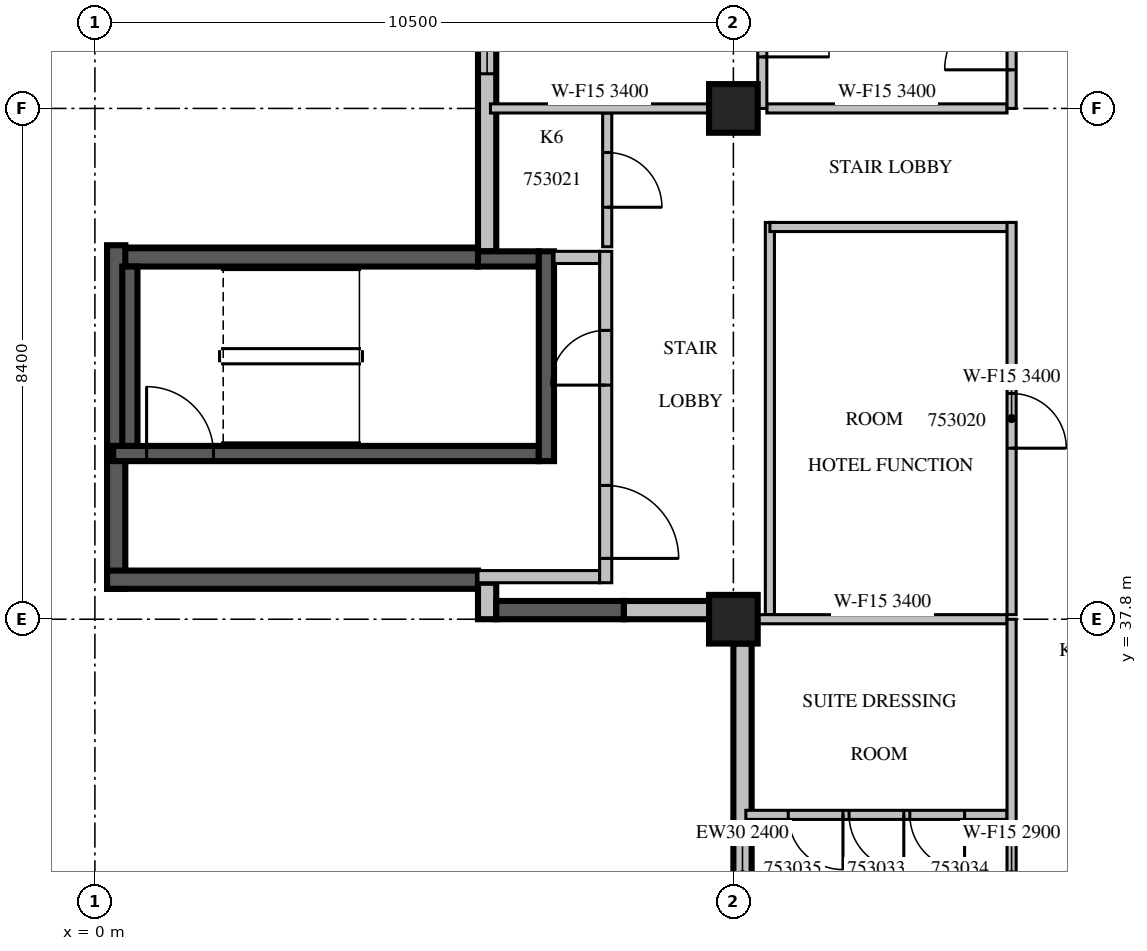
"""IFC4 building model, lengths in metres.
Left out: names, types, materials, properties, quantities, classifications, styles, units other than length and angle.
Written with IfcOpenShell. Run it as: python <this file> out.ifc"""

import sys

from ifc_helpers import new_model, si_unit, direction, frame, frame_2d, origin, origin_2d, place, context, subcontext, project, spatial, rectangle, extrude, source, transform, mapped, element, fill, save


model = new_model("IFC4")
c1 = context("Model", 3, precision=1e-05, world=origin(), true_north=direction((0.0, 1.0)))
c2 = subcontext(c1, "Body", "Model", "MODEL_VIEW")
j1 = project(units=[si_unit("LENGTHUNIT", "METRE"), si_unit("PLANEANGLEUNIT", "RADIAN")], contexts=[c1])
p1 = place(None, origin())
s1 = spatial("IfcSite", under=j1, at=p1, CompositionType="ELEMENT")
p2 = place(p1, origin())
s2 = spatial("IfcBuilding", under=s1, at=p2, CompositionType="ELEMENT")
p3 = place(p2, frame((0.0, 0.0, 234.8)))
s3 = spatial("IfcBuildingStorey", under=s2, at=p3, CompositionType="ELEMENT", Elevation=234.8)
m1 = source(origin(), c2, "Body", "SweptSolid", [
    extrude(rectangle(XDim=0.8, YDim=0.8, at=origin_2d()), origin(), (0.0, 0.0, 1.0), 3.8),
])
for number, where, z_axis, x_axis in (
    (1, (10.5, 37.8, 0.0), (0.0, 0.0, 1.0), (1.0, 0.0, 0.0)),
    (2, (10.5, 46.2, 0.0), (0.0, 0.0, 1.0), (1.0, 0.0, 0.0)),
):
    element("IfcColumn", number, at=place(p3, frame(where, z_axis=z_axis, x_axis=x_axis)), inside=s3, PredefinedType="COLUMN", context=c2, shape_type="MappedRepresentation", body=[
        mapped(m1, transform((0.0, 0.0, 0.0), scale=1.0)),
    ])
m2 = source(origin(), c2, "Body", "SweptSolid", [
    extrude(rectangle(XDim=9.91, YDim=0.3, at=frame_2d((4.955, 0.0))), origin(), (0.0, 0.0, 1.0), 3.4),
])
p4 = place(p3, frame((6.45, 53.76, 0.0), z_axis=(0.0, 0.0, 1.0), x_axis=(0.0, -1.0, 0.0)))
e3 = element("IfcWall", 3, at=p4, inside=s3, PredefinedType="STANDARD", context=c2, shape_type="MappedRepresentation", body=[
    mapped(m2, transform((0.0, 0.0, 0.0), scale=1.0)),
])
m3 = source(origin(), c2, "Body", "SweptSolid", [
    extrude(rectangle(XDim=3.6, YDim=2.3, at=frame_2d((1.8, 1.15))), frame((0.0, 0.16, 0.0), z_axis=(0.0, -1.0, 0.0), x_axis=(1.0, 0.0, 0.0)), (0.0, 0.0, 1.0), 0.32),
])
p5 = place(p4, frame((3.39, 0.0, 0.6)))
e4 = element("IfcOpeningElement", 4, at=p5, cuts=e3, PredefinedType="OPENING", context=c2, shape_type="MappedRepresentation", body=[
    mapped(m3, transform((0.0, 0.0, 0.0), scale=1.0)),
])
m4 = source(origin(), c2, "Body", "SweptSolid", [
    extrude(rectangle(XDim=2.4, YDim=2.3, at=frame_2d((1.2, 1.15))), frame((0.0, 0.16, 0.0), z_axis=(0.0, -1.0, 0.0), x_axis=(1.0, 0.0, 0.0)), (0.0, 0.0, 1.0), 0.32),
])
p6 = place(p4, frame((0.495, 0.0, 0.6)))
e5 = element("IfcOpeningElement", 5, at=p6, cuts=e3, PredefinedType="OPENING", context=c2, shape_type="MappedRepresentation", body=[
    mapped(m4, transform((0.0, 0.0, 0.0), scale=1.0)),
])
m5 = source(origin(), c2, "Body", "SweptSolid", [
    extrude(rectangle(XDim=6.1, YDim=0.3, at=frame_2d((3.05, 0.0))), origin(), (0.0, 0.0, 1.0), 3.4),
])
p7 = place(p3, frame((6.3, 43.75, 0.0), z_axis=(0.0, 0.0, 1.0), x_axis=(-1.0, 0.0, 0.0)))
e6 = element("IfcWall", 6, at=p7, inside=s3, PredefinedType="SOLIDWALL", context=c2, shape_type="MappedRepresentation", body=[
    mapped(m5, transform((0.0, 0.0, 0.0), scale=1.0)),
])
m6 = source(origin(), c2, "Body", "SweptSolid", [
    extrude(rectangle(XDim=5.65, YDim=0.3, at=frame_2d((2.825, 0.0))), origin(), (0.0, 0.0, 1.0), 3.4),
])
p8 = place(p3, frame((0.35, 43.95, 0.0), z_axis=(0.0, 0.0, 1.0), x_axis=(0.0, -1.0, 0.0)))
e7 = element("IfcWall", 7, at=p8, inside=s3, PredefinedType="SOLIDWALL", context=c2, shape_type="MappedRepresentation", body=[
    mapped(m6, transform((0.0, 0.0, 0.0), scale=1.0)),
])
p9 = place(p3, frame((0.2, 38.45, 0.0), z_axis=(0.0, 0.0, 1.0), x_axis=(1.0, 0.0, 0.0)))
e8 = element("IfcWall", 8, at=p9, inside=s3, PredefinedType="SOLIDWALL", context=c2, shape_type="MappedRepresentation", body=[
    mapped(m5, transform((0.0, 0.0, 0.0), scale=1.0)),
])
m7 = source(origin(), c2, "Body", "SweptSolid", [
    extrude(rectangle(XDim=0.6, YDim=0.3, at=frame_2d((0.3, 0.0))), origin(), (0.0, 0.0, 1.0), 3.4),
])
p10 = place(p3, frame((6.45, 38.4, 0.0), z_axis=(0.0, 0.0, 1.0), x_axis=(0.0, -1.0, 0.0)))
e9 = element("IfcWall", 9, at=p10, inside=s3, PredefinedType="STANDARD", context=c2, shape_type="MappedRepresentation", body=[
    mapped(m7, transform((0.0, 0.0, 0.0), scale=1.0)),
])
m8 = source(origin(), c2, "Body", "SweptSolid", [
    extrude(rectangle(XDim=2.1, YDim=0.3, at=frame_2d((1.05, 0.0))), origin(), (0.0, 0.0, 1.0), 3.4),
])
p11 = place(p3, frame((6.6, 37.95, 0.0), z_axis=(0.0, 0.0, 1.0), x_axis=(1.0, 0.0, 0.0)))
e10 = element("IfcWall", 10, at=p11, inside=s3, PredefinedType="SOLIDWALL", context=c2, shape_type="MappedRepresentation", body=[
    mapped(m8, transform((0.0, 0.0, 0.0), scale=1.0)),
])
m9 = source(origin(), c2, "Body", "SweptSolid", [
    extrude(rectangle(XDim=1.4, YDim=0.3, at=frame_2d((0.7, 0.0))), origin(), (0.0, 0.0, 1.0), 3.4),
])
p12 = place(p3, frame((8.7, 37.95, 0.0), z_axis=(0.0, 0.0, 1.0), x_axis=(1.0, 0.0, 0.0)))
e11 = element("IfcWall", 11, at=p12, inside=s3, PredefinedType="STANDARD", context=c2, shape_type="MappedRepresentation", body=[
    mapped(m9, transform((0.0, 0.0, 0.0), scale=1.0)),
])
p13 = place(p3, frame((10.65, 37.4, 0.0), z_axis=(0.0, 0.0, 1.0), x_axis=(0.0, -1.0, 0.0)))
e12 = element("IfcWall", 12, at=p13, inside=s3, PredefinedType="STANDARD", context=c2, shape_type="SweptSolid", body=[
    extrude(rectangle(XDim=7.6, YDim=0.3, at=frame_2d((3.8, 0.0))), origin(), (0.0, 0.0, 1.0), 2.4),
])
m10 = source(origin(), c2, "Body", "SweptSolid", [
    extrude(rectangle(XDim=7.0, YDim=0.25, at=frame_2d((3.5, 0.0))), origin(), (0.0, 0.0, 1.0), 3.4),
])
p14 = place(p3, frame((0.3, 40.525, 0.0), z_axis=(0.0, 0.0, 1.0), x_axis=(1.0, 0.0, 0.0)))
e13 = element("IfcWall", 13, at=p14, inside=s3, PredefinedType="SOLIDWALL", context=c2, shape_type="MappedRepresentation", body=[
    mapped(m10, transform((0.0, 0.0, 0.0), scale=1.0)),
])
m11 = source(origin(), c2, "Body", "SweptSolid", [
    extrude(rectangle(XDim=1.1, YDim=2.1, at=frame_2d((0.55, 1.05))), frame((0.0, 0.135, 0.0), z_axis=(0.0, -1.0, 0.0), x_axis=(1.0, 0.0, 0.0)), (0.0, 0.0, 1.0), 0.27),
])
p15 = place(p14, frame((0.55, 0.0, 0.0)))
e14 = element("IfcOpeningElement", 14, at=p15, cuts=e13, PredefinedType="OPENING", context=c2, shape_type="MappedRepresentation", body=[
    mapped(m11, transform((0.0, 0.0, 0.0), scale=1.0)),
])
m12 = source(origin(), c2, "Body", "SweptSolid", [
    extrude(rectangle(XDim=1.0, YDim=0.25, at=frame_2d((0.5, 0.0))), origin(), (0.0, 0.0, 1.0), 3.4),
])
p16 = place(p3, frame((6.3, 43.725, 0.0), z_axis=(0.0, 0.0, 1.0), x_axis=(1.0, 0.0, 0.0)))
e15 = element("IfcWall", 15, at=p16, inside=s3, PredefinedType="SOLIDWALL", context=c2, shape_type="MappedRepresentation", body=[
    mapped(m12, transform((0.0, 0.0, 0.0), scale=1.0)),
])
m13 = source(origin(), c2, "Body", "SweptSolid", [
    extrude(rectangle(XDim=3.45, YDim=0.25, at=frame_2d((1.725, 0.0))), origin(), (0.0, 0.0, 1.0), 3.4),
])
p17 = place(p3, frame((7.425, 40.4, 0.0), z_axis=(0.0, 0.0, 1.0), x_axis=(0.0, 1.0, 0.0)))
e16 = element("IfcWall", 16, at=p17, inside=s3, PredefinedType="SOLIDWALL", context=c2, shape_type="MappedRepresentation", body=[
    mapped(m13, transform((0.0, 0.0, 0.0), scale=1.0)),
])
m14 = source(origin(), c2, "Body", "SweptSolid", [
    extrude(rectangle(XDim=2.95, YDim=0.25, at=frame_2d((1.475, 0.0))), origin(), (0.0, 0.0, 1.0), 3.4),
])
p18 = place(p3, frame((0.575, 40.65, 0.0), z_axis=(0.0, 0.0, 1.0), x_axis=(0.0, 1.0, 0.0)))
e17 = element("IfcWall", 17, at=p18, inside=s3, PredefinedType="SOLIDWALL", context=c2, shape_type="MappedRepresentation", body=[
    mapped(m14, transform((0.0, 0.0, 0.0), scale=1.0)),
])
m15 = source(origin(), c2, "Body", "SweptSolid", [
    extrude(rectangle(XDim=2.0, YDim=0.2, at=frame_2d((1.0, 0.0))), origin(), (0.0, 0.0, 1.0), 3.4),
])
p19 = place(p3, frame((6.3, 38.5, 0.0), z_axis=(0.0, 0.0, 1.0), x_axis=(1.0, 0.0, 0.0)))
e18 = element("IfcWall", 18, at=p19, inside=s3, PredefinedType="PARTITIONING", context=c2, shape_type="MappedRepresentation", body=[
    mapped(m15, transform((0.0, 0.0, 0.0), scale=1.0)),
])
m16 = source(origin(), c2, "Body", "SweptSolid", [
    extrude(rectangle(XDim=5.45, YDim=0.2, at=frame_2d((2.725, 0.0))), origin(), (0.0, 0.0, 1.0), 3.4),
])
p20 = place(p3, frame((8.4, 38.4, 0.0), z_axis=(0.0, 0.0, 1.0), x_axis=(0.0, 1.0, 0.0)))
e19 = element("IfcWall", 19, at=p20, inside=s3, PredefinedType="PARTITIONING", context=c2, shape_type="MappedRepresentation", body=[
    mapped(m16, transform((0.0, 0.0, 0.0), scale=1.0)),
])
m17 = source(origin(), c2, "Body", "SweptSolid", [
    extrude(rectangle(XDim=1.2, YDim=2.1, at=frame_2d((0.6, 1.05))), frame((0.0, 0.11, 0.0), z_axis=(0.0, -1.0, 0.0), x_axis=(1.0, 0.0, 0.0)), (0.0, 0.0, 1.0), 0.22),
])
p21 = place(p20, frame((0.4, 0.0, 0.0)))
e20 = element("IfcOpeningElement", 20, at=p21, cuts=e19, PredefinedType="OPENING", context=c2, shape_type="MappedRepresentation", body=[
    mapped(m17, transform((0.0, 0.0, 0.0), scale=1.0)),
])
m18 = source(origin(), c2, "Body", "SweptSolid", [
    extrude(rectangle(XDim=0.9, YDim=2.1, at=frame_2d((0.45, 1.05))), frame((0.0, 0.11, 0.0), z_axis=(0.0, -1.0, 0.0), x_axis=(1.0, 0.0, 0.0)), (0.0, 0.0, 1.0), 0.22),
])
p22 = place(p20, frame((3.25, 0.0, 0.0)))
e21 = element("IfcOpeningElement", 21, at=p22, cuts=e19, PredefinedType="OPENING", context=c2, shape_type="MappedRepresentation", body=[
    mapped(m18, transform((0.0, 0.0, 0.0), scale=1.0)),
])
m19 = source(origin(), c2, "Body", "SweptSolid", [
    extrude(rectangle(XDim=0.75, YDim=0.2, at=frame_2d((0.375, 0.0))), origin(), (0.0, 0.0, 1.0), 3.4),
])
p23 = place(p3, frame((7.55, 43.75, 0.0), z_axis=(0.0, 0.0, 1.0), x_axis=(1.0, 0.0, 0.0)))
e22 = element("IfcWall", 22, at=p23, inside=s3, PredefinedType="PARTITIONING", context=c2, shape_type="MappedRepresentation", body=[
    mapped(m19, transform((0.0, 0.0, 0.0), scale=1.0)),
])
m20 = source(origin(), c2, "Body", "SweptSolid", [
    extrude(rectangle(XDim=6.45, YDim=0.15, at=frame_2d((3.225, 0.0))), origin(), (0.0, 0.0, 1.0), 3.4),
])
p24 = place(p3, frame((11.1, 44.325, 0.0), z_axis=(0.0, 0.0, 1.0), x_axis=(0.0, -1.0, 0.0)))
e23 = element("IfcWall", 23, at=p24, inside=s3, PredefinedType="PARTITIONING", context=c2, shape_type="MappedRepresentation", body=[
    mapped(m20, transform((0.0, 0.0, 0.0), scale=1.0)),
])
m21 = source(origin(), c2, "Body", "SweptSolid", [
    extrude(rectangle(XDim=3.975, YDim=0.15, at=frame_2d((1.988, 0.0))), origin(), (0.0, 0.0, 1.0), 3.4),
])
p25 = place(p3, frame((15.075, 44.25, 0.0), z_axis=(0.0, 0.0, 1.0), x_axis=(-1.0, 0.0, 0.0)))
e24 = element("IfcWall", 24, at=p25, inside=s3, PredefinedType="PARTITIONING", context=c2, shape_type="MappedRepresentation", body=[
    mapped(m21, transform((0.0, 0.0, 0.0), scale=1.0)),
])
p26 = place(p3, frame((15.075, 37.875, 0.0), z_axis=(0.0, 0.0, 1.0), x_axis=(0.0, 1.0, 0.0)))
e25 = element("IfcWall", 25, at=p26, inside=s3, PredefinedType="PARTITIONING", context=c2, shape_type="MappedRepresentation", body=[
    mapped(m20, transform((0.0, 0.0, 0.0), scale=1.0)),
])
m22 = source(origin(), c2, "Body", "SweptSolid", [
    extrude(rectangle(XDim=0.9, YDim=2.1, at=frame_2d((0.45, 1.05))), frame((0.0, 0.085, 0.0), z_axis=(0.0, -1.0, 0.0), x_axis=(1.0, 0.0, 0.0)), (0.0, 0.0, 1.0), 0.17),
])
p27 = place(p26, frame((2.737, 0.0, 0.0)))
e26 = element("IfcOpeningElement", 26, at=p27, cuts=e25, PredefinedType="OPENING", context=c2, shape_type="MappedRepresentation", body=[
    mapped(m22, transform((0.0, 0.0, 0.0), scale=1.0)),
])
m23 = source(origin(), c2, "Body", "SweptSolid", [
    extrude(rectangle(XDim=2.2, YDim=0.15, at=frame_2d((1.1, 0.0))), origin(), (0.0, 0.0, 1.0), 3.4),
])
p28 = place(p3, frame((8.425, 43.925, 0.0), z_axis=(0.0, 0.0, 1.0), x_axis=(0.0, 1.0, 0.0)))
e27 = element("IfcWall", 27, at=p28, inside=s3, PredefinedType="PARTITIONING", context=c2, shape_type="MappedRepresentation", body=[
    mapped(m23, transform((0.0, 0.0, 0.0), scale=1.0)),
])
p29 = place(p28, frame((0.65, 0.0, 0.0)))
e28 = element("IfcOpeningElement", 28, at=p29, cuts=e27, PredefinedType="OPENING", context=c2, shape_type="MappedRepresentation", body=[
    mapped(m22, transform((0.0, 0.0, 0.0), scale=1.0)),
])
m24 = source(origin(), c2, "Body", "SweptSolid", [
    extrude(rectangle(XDim=4.295, YDim=0.15, at=frame_2d((2.147, 0.0))), origin(), (0.0, 0.0, 1.0), 3.4),
])
p30 = place(p3, frame((15.0, 34.583, 0.0), z_axis=(0.0, 0.0, 1.0), x_axis=(-1.0, 0.0, 0.0)))
e29 = element("IfcWall", 29, at=p30, inside=s3, PredefinedType="PARTITIONING", context=c2, shape_type="MappedRepresentation", body=[
    mapped(m24, transform((0.0, 0.0, 0.0), scale=1.0)),
])
p31 = place(p30, frame((1.698, 0.0, 0.0)))
e30 = element("IfcOpeningElement", 30, at=p31, cuts=e29, PredefinedType="OPENING", context=c2, shape_type="MappedRepresentation", body=[
    mapped(m22, transform((0.0, 0.0, 0.0), scale=1.0)),
])
p32 = place(p30, frame((0.698, 0.0, 0.0)))
e31 = element("IfcOpeningElement", 31, at=p32, cuts=e29, PredefinedType="OPENING", context=c2, shape_type="MappedRepresentation", body=[
    mapped(m22, transform((0.0, 0.0, 0.0), scale=1.0)),
])
p33 = place(p30, frame((2.698, 0.0, 0.0)))
e32 = element("IfcOpeningElement", 32, at=p33, cuts=e29, PredefinedType="OPENING", context=c2, shape_type="MappedRepresentation", body=[
    mapped(m22, transform((0.0, 0.0, 0.0), scale=1.0)),
])
m25 = source(origin(), c2, "Body", "SweptSolid", [
    extrude(rectangle(XDim=4.101, YDim=0.15, at=frame_2d((2.05, 0.0))), origin(), (0.0, 0.0, 1.0), 3.4),
])
p34 = place(p3, frame((15.0, 37.8, 0.0), z_axis=(0.0, 0.0, 1.0), x_axis=(-1.0, 0.0, 0.0)))
e33 = element("IfcWall", 33, at=p34, inside=s3, PredefinedType="PARTITIONING", context=c2, shape_type="MappedRepresentation", body=[
    mapped(m25, transform((0.0, 0.0, 0.0), scale=1.0)),
])
m26 = source(origin(), c2, "Body", "SweptSolid", [
    extrude(rectangle(XDim=3.596, YDim=0.15, at=frame_2d((1.798, 0.0))), origin(), (0.0, 0.0, 1.0), 3.4),
])
p35 = place(p3, frame((10.101, 46.2, 0.0), z_axis=(0.0, 0.0, 1.0), x_axis=(-1.0, 0.0, 0.0)))
e34 = element("IfcWall", 34, at=p35, inside=s3, PredefinedType="PARTITIONING", context=c2, shape_type="MappedRepresentation", body=[
    mapped(m26, transform((0.0, 0.0, 0.0), scale=1.0)),
])
m27 = source(origin(), c2, "Body", "SweptSolid", [
    extrude(rectangle(XDim=3.95, YDim=0.15, at=frame_2d((1.975, 0.0))), origin(), (0.0, 0.0, 1.0), 3.4),
])
p36 = place(p3, frame((15.0, 46.2, 0.0), z_axis=(0.0, 0.0, 1.0), x_axis=(-1.0, 0.0, 0.0)))
e35 = element("IfcWall", 35, at=p36, inside=s3, PredefinedType="PARTITIONING", context=c2, shape_type="MappedRepresentation", body=[
    mapped(m27, transform((0.0, 0.0, 0.0), scale=1.0)),
])
m28 = source(origin(), c2, "Body", "SweptSolid", [
    extrude(rectangle(XDim=7.26, YDim=0.15, at=frame_2d((3.63, 0.0))), origin(), (0.0, 0.0, 1.0), 3.4),
])
p37 = place(p3, frame((10.975, 46.2, 0.0), z_axis=(0.0, 0.0, 1.0), x_axis=(0.0, 1.0, 0.0)))
e36 = element("IfcWall", 36, at=p37, inside=s3, PredefinedType="PARTITIONING", context=c2, shape_type="MappedRepresentation", body=[
    mapped(m28, transform((0.0, 0.0, 0.0), scale=1.0)),
])
m29 = source(origin(), c2, "Body", "SweptSolid", [
    extrude(rectangle(XDim=1.1, YDim=2.1, at=frame_2d((0.55, 1.05))), frame((0.0, 0.085, 0.0), z_axis=(0.0, -1.0, 0.0), x_axis=(1.0, 0.0, 0.0)), (0.0, 0.0, 1.0), 0.17),
])
p38 = place(p37, frame((0.847, 0.0, 0.0)))
e37 = element("IfcOpeningElement", 37, at=p38, cuts=e36, PredefinedType="OPENING", context=c2, shape_type="MappedRepresentation", body=[
    mapped(m29, transform((0.0, 0.0, 0.0), scale=1.0)),
])
p39 = place(p37, frame((2.946, 0.0, 0.0)))
e38 = element("IfcOpeningElement", 38, at=p39, cuts=e36, PredefinedType="OPENING", context=c2, shape_type="MappedRepresentation", body=[
    mapped(m22, transform((0.0, 0.0, 0.0), scale=1.0)),
])
p40 = place(p37, frame((4.529, 0.0, 0.0)))
e39 = element("IfcOpeningElement", 39, at=p40, cuts=e36, PredefinedType="OPENING", context=c2, shape_type="MappedRepresentation", body=[
    mapped(m22, transform((0.0, 0.0, 0.0), scale=1.0)),
])
m30 = source(origin(), c2, "Body", "SweptSolid", [
    extrude(rectangle(XDim=8.4, YDim=0.15, at=frame_2d((4.2, 0.0))), origin(), (0.0, 0.0, 1.0), 2.9),
])
p41 = place(p3, frame((15.075, 29.4, 0.0), z_axis=(0.0, 0.0, 1.0), x_axis=(0.0, 1.0, 0.0)))
e40 = element("IfcWall", 40, at=p41, inside=s3, PredefinedType="PARTITIONING", context=c2, shape_type="MappedRepresentation", body=[
    mapped(m30, transform((0.0, 0.0, 0.0), scale=1.0)),
])
p42 = place(p41, frame((0.638, 0.0, 0.0)))
e41 = element("IfcOpeningElement", 41, at=p42, cuts=e40, PredefinedType="OPENING", context=c2, shape_type="MappedRepresentation", body=[
    mapped(m29, transform((0.0, 0.0, 0.0), scale=1.0)),
])
p43 = place(p3, frame((15.075, 46.2, 0.0), z_axis=(0.0, 0.0, 1.0), x_axis=(0.0, 1.0, 0.0)))
e42 = element("IfcWall", 42, at=p43, inside=s3, PredefinedType="PARTITIONING", context=c2, shape_type="MappedRepresentation", body=[
    mapped(m28, transform((0.0, 0.0, 0.0), scale=1.0)),
])
p44 = place(p43, frame((0.635, 0.0, 0.0)))
e43 = element("IfcOpeningElement", 43, at=p44, cuts=e42, PredefinedType="OPENING", context=c2, shape_type="MappedRepresentation", body=[
    mapped(m29, transform((0.0, 0.0, 0.0), scale=1.0)),
])
m31 = source(origin(), c2, "Body", "SweptSolid", [
    extrude(rectangle(XDim=3.6, YDim=2.3, at=frame_2d((1.8, 1.15))), frame((0.0, 0.03, 0.0), z_axis=(0.0, -1.0, 0.0), x_axis=(1.0, 0.0, 0.0)), (0.0, 0.0, 1.0), 0.06),
])
p45 = place(p5, origin())
e44 = element("IfcWindow", 44, at=p45, inside=s3, PartitioningType="SINGLE_PANEL", PredefinedType="WINDOW", context=c2, shape_type="MappedRepresentation", body=[
    mapped(m31, transform((0.0, 0.0, 0.0), scale=1.0)),
])
fill(e4, e44)
m32 = source(origin(), c2, "Body", "SweptSolid", [
    extrude(rectangle(XDim=1.1, YDim=2.1, at=frame_2d((0.55, 1.05))), frame((0.0, 0.025, 0.0), z_axis=(0.0, -1.0, 0.0), x_axis=(1.0, 0.0, 0.0)), (0.0, 0.0, 1.0), 0.05),
])
p46 = place(p15, origin())
e45 = element("IfcDoor", 45, at=p46, inside=s3, OperationType="SINGLE_SWING_LEFT", PredefinedType="DOOR", context=c2, shape_type="MappedRepresentation", body=[
    mapped(m32, transform((0.0, 0.0, 0.0), scale=1.0)),
])
fill(e14, e45)
m33 = source(origin(), c2, "Body", "SweptSolid", [
    extrude(rectangle(XDim=1.2, YDim=2.1, at=frame_2d((0.6, 1.05))), frame((0.0, 0.025, 0.0), z_axis=(0.0, -1.0, 0.0), x_axis=(1.0, 0.0, 0.0)), (0.0, 0.0, 1.0), 0.05),
])
p47 = place(p21, origin())
e46 = element("IfcDoor", 46, at=p47, inside=s3, OperationType="SINGLE_SWING_RIGHT", PredefinedType="DOOR", context=c2, shape_type="MappedRepresentation", body=[
    mapped(m33, transform((0.0, 0.0, 0.0), scale=1.0)),
])
fill(e20, e46)
m34 = source(origin(), c2, "Body", "SweptSolid", [
    extrude(rectangle(XDim=0.9, YDim=2.1, at=frame_2d((0.45, 1.05))), frame((0.0, 0.025, 0.0), z_axis=(0.0, -1.0, 0.0), x_axis=(1.0, 0.0, 0.0)), (0.0, 0.0, 1.0), 0.05),
])
p48 = place(p22, origin())
e47 = element("IfcDoor", 47, at=p48, inside=s3, OperationType="SINGLE_SWING_LEFT", PredefinedType="DOOR", context=c2, shape_type="MappedRepresentation", body=[
    mapped(m34, transform((0.0, 0.0, 0.0), scale=1.0)),
])
fill(e21, e47)
p49 = place(p27, origin())
e48 = element("IfcDoor", 48, at=p49, inside=s3, OperationType="SINGLE_SWING_RIGHT", PredefinedType="DOOR", context=c2, shape_type="MappedRepresentation", body=[
    mapped(m34, transform((0.0, 0.0, 0.0), scale=1.0)),
])
fill(e26, e48)
p50 = place(p29, origin())
e49 = element("IfcDoor", 49, at=p50, inside=s3, OperationType="SINGLE_SWING_RIGHT", PredefinedType="DOOR", context=c2, shape_type="MappedRepresentation", body=[
    mapped(m34, transform((0.0, 0.0, 0.0), scale=1.0)),
])
fill(e28, e49)
p51 = place(p44, origin())
e50 = element("IfcDoor", 50, at=p51, inside=s3, OperationType="SINGLE_SWING_LEFT", PredefinedType="DOOR", context=c2, shape_type="MappedRepresentation", body=[
    mapped(m32, transform((0.0, 0.0, 0.0), scale=1.0)),
])
fill(e43, e50)
p52 = place(p38, origin())
e51 = element("IfcDoor", 51, at=p52, inside=s3, OperationType="SINGLE_SWING_RIGHT", PredefinedType="DOOR", context=c2, shape_type="MappedRepresentation", body=[
    mapped(m32, transform((0.0, 0.0, 0.0), scale=1.0)),
])
fill(e37, e51)
p53 = place(p31, origin())
e52 = element("IfcDoor", 52, at=p53, inside=s3, OperationType="SINGLE_SWING_LEFT", PredefinedType="DOOR", context=c2, shape_type="MappedRepresentation", body=[
    mapped(m34, transform((0.0, 0.0, 0.0), scale=1.0)),
])
fill(e30, e52)
p54 = place(p32, origin())
e53 = element("IfcDoor", 53, at=p54, inside=s3, OperationType="SINGLE_SWING_LEFT", PredefinedType="DOOR", context=c2, shape_type="MappedRepresentation", body=[
    mapped(m34, transform((0.0, 0.0, 0.0), scale=1.0)),
])
fill(e31, e53)
p55 = place(p33, origin())
e54 = element("IfcDoor", 54, at=p55, inside=s3, OperationType="SINGLE_SWING_LEFT", PredefinedType="DOOR", context=c2, shape_type="MappedRepresentation", body=[
    mapped(m34, transform((0.0, 0.0, 0.0), scale=1.0)),
])
fill(e32, e54)
save(model, sys.argv[1])
